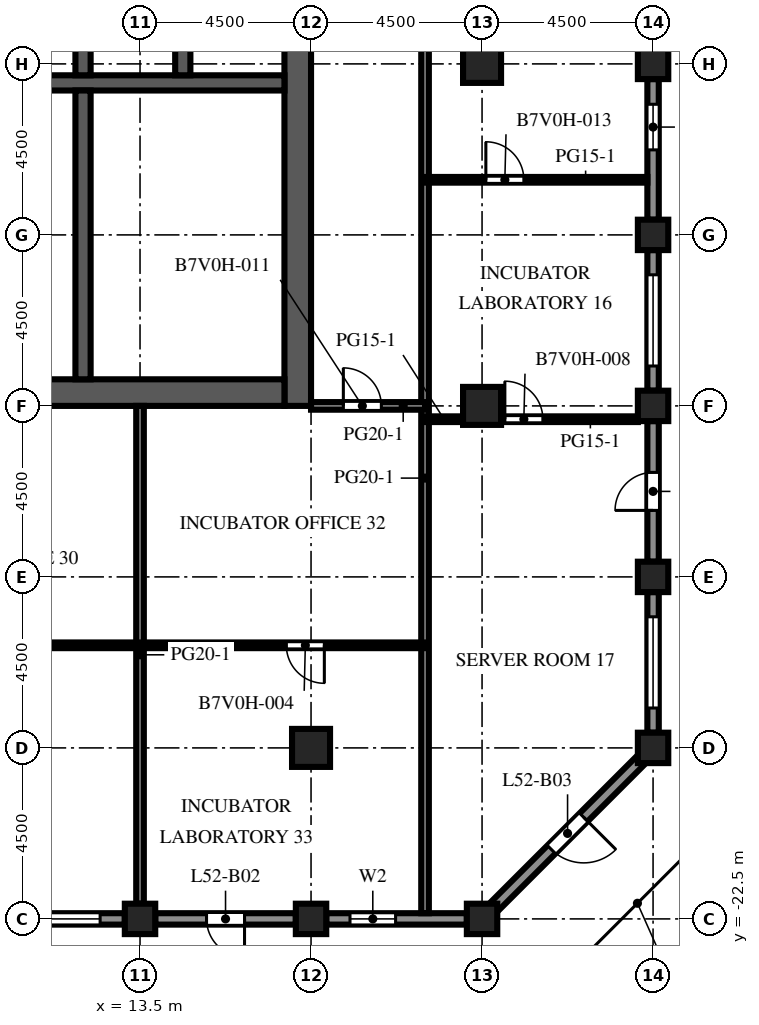
"""IFC4 building model, lengths in metres.
Left out: names, types, materials, properties, quantities, classifications, styles, units other than length and angle.
Written with IfcOpenShell. Run it as: python <this file> out.ifc"""

import sys

from ifc_helpers import new_model, si_unit, direction, frame, frame_2d, origin, origin_2d, place, context, subcontext, project, spatial, rectangle, extrude, element, fill, save


model = new_model("IFC4")
c1 = context("Model", 3, precision=1e-05, world=origin(), true_north=direction((0.0, 1.0)))
c2 = subcontext(c1, "Body", "Model", "MODEL_VIEW")
j1 = project(units=[si_unit("LENGTHUNIT", "METRE"), si_unit("PLANEANGLEUNIT", "RADIAN")], contexts=[c1])
p1 = place(None, origin())
s1 = spatial("IfcSite", under=j1, at=p1, CompositionType="ELEMENT")
p2 = place(p1, origin())
s2 = spatial("IfcBuilding", under=s1, at=p2, CompositionType="ELEMENT")
p3 = place(p2, frame((0.0, 0.0, 231.6)))
s3 = spatial("IfcBuildingStorey", under=s2, at=p3, CompositionType="ELEMENT", Elevation=231.6)
for number, where, z_axis, x_axis in (
    (1, (13.5, -22.5, 0.0), (0.0, 0.0, 1.0), (1.0, 0.0, 0.0)),
    (2, (18.0, -22.5, 0.0), (0.0, 0.0, 1.0), (1.0, 0.0, 0.0)),
    (3, (22.5, -22.5, 0.0), (0.0, 0.0, 1.0), (1.0, 0.0, 0.0)),
    (4, (27.0, -18.0, 0.0), (0.0, 0.0, 1.0), (1.0, 0.0, 0.0)),
    (5, (27.0, -13.5, 0.0), (0.0, 0.0, 1.0), (1.0, 0.0, 0.0)),
    (6, (27.0, -9.0, 0.0), (0.0, 0.0, 1.0), (1.0, 0.0, 0.0)),
    (7, (27.0, -4.5, 0.0), (0.0, 0.0, 1.0), (1.0, 0.0, 0.0)),
    (8, (27.0, 0.0, 0.0), (0.0, 0.0, 1.0), (1.0, 0.0, 0.0)),
):
    element("IfcColumn", number, at=place(p3, frame(where, z_axis=z_axis, x_axis=x_axis)), inside=s3, PredefinedType="COLUMN", context=c2, shape_type="SweptSolid", body=[
        extrude(rectangle(XDim=0.8, YDim=0.8, at=origin_2d()), origin(), (0.0, 0.0, 1.0), 4.1),
    ])
for number, where, z_axis, x_axis in (
    (9, (18.0, -18.0, 0.0), (0.0, 0.0, 1.0), (1.0, 0.0, 0.0)),
    (10, (22.5, -9.0, 0.0), (0.0, 0.0, 1.0), (1.0, 0.0, 0.0)),
    (11, (22.5, 0.0, 0.0), (0.0, 0.0, 1.0), (1.0, 0.0, 0.0)),
):
    element("IfcColumn", number, at=place(p3, frame(where, z_axis=z_axis, x_axis=x_axis)), inside=s3, PredefinedType="COLUMN", context=c2, shape_type="SweptSolid", body=[
        extrude(rectangle(XDim=1.0, YDim=1.0, at=origin_2d()), origin(), (0.0, 0.0, 1.0), 4.1),
    ])
p4 = place(p3, frame((17.65, -9.0, 0.0), z_axis=(0.0, 0.0, 1.0), x_axis=(0.0, 1.0, 0.0)))
e12 = element("IfcWall", 12, at=p4, inside=s3, PredefinedType="SHEAR", context=c2, shape_type="SweptSolid", body=[
    extrude(rectangle(XDim=27.5, YDim=0.7, at=frame_2d((13.75, 0.0))), origin(), (0.0, 0.0, 1.0), 4.1),
])
p5 = place(p4, frame((12.55, 0.0, 0.0)))
e13 = element("IfcOpeningElement", 13, at=p5, cuts=e12, PredefinedType="OPENING", context=c2, shape_type="SweptSolid", body=[
    extrude(rectangle(XDim=2.4, YDim=2.4, at=frame_2d((1.2, 1.2))), frame((0.0, 0.36, 0.0), z_axis=(0.0, -1.0, 0.0), x_axis=(1.0, 0.0, 0.0)), (0.0, 0.0, 1.0), 0.72),
])
p6 = place(p4, frame((6.825, 0.0, 0.0)))
e14 = element("IfcOpeningElement", 14, at=p6, cuts=e12, PredefinedType="OPENING", context=c2, shape_type="SweptSolid", body=[
    extrude(rectangle(XDim=1.2, YDim=2.1, at=frame_2d((0.6, 1.05))), frame((0.0, 0.36, 0.0), z_axis=(0.0, -1.0, 0.0), x_axis=(1.0, 0.0, 0.0)), (0.0, 0.0, 1.0), 0.72),
])
p7 = place(p4, frame((19.475, 0.0, 0.0)))
e15 = element("IfcOpeningElement", 15, at=p7, cuts=e12, PredefinedType="OPENING", context=c2, shape_type="SweptSolid", body=[
    extrude(rectangle(XDim=1.2, YDim=2.1, at=frame_2d((0.6, 1.05))), frame((0.0, 0.36, 0.0), z_axis=(0.0, -1.0, 0.0), x_axis=(1.0, 0.0, 0.0)), (0.0, 0.0, 1.0), 0.72),
])
p8 = place(p3, frame((6.7, -8.65, 0.0), z_axis=(0.0, 0.0, 1.0), x_axis=(1.0, 0.0, 0.0)))
e16 = element("IfcWall", 16, at=p8, inside=s3, PredefinedType="SHEAR", context=c2, shape_type="SweptSolid", body=[
    extrude(rectangle(XDim=10.6, YDim=0.7, at=frame_2d((5.3, 0.0))), origin(), (0.0, 0.0, 1.0), 4.1),
])
p9 = place(p3, frame((6.7, -0.5, 0.0), z_axis=(0.0, 0.0, 1.0), x_axis=(1.0, 0.0, 0.0)))
e17 = element("IfcWall", 17, at=p9, inside=s3, PredefinedType="SHEAR", context=c2, shape_type="SweptSolid", body=[
    extrude(rectangle(XDim=10.6, YDim=0.4, at=frame_2d((5.3, 0.0))), origin(), (0.0, 0.0, 1.0), 4.1),
])
for number, where, z_axis, x_axis in (
    (18, (12.0, -0.3, 0.0), (0.0, 0.0, 1.0), (0.0, 1.0, 0.0)),
    (19, (14.625, -0.3, 0.0), (0.0, 0.0, 1.0), (0.0, 1.0, 0.0)),
):
    element("IfcWall", number, at=place(p3, frame(where, z_axis=z_axis, x_axis=x_axis)), inside=s3, PredefinedType="SHEAR", context=c2, shape_type="SweptSolid", body=[
        extrude(rectangle(XDim=2.9, YDim=0.4, at=frame_2d((1.45, 0.0))), origin(), (0.0, 0.0, 1.0), 4.1),
    ])
p10 = place(p3, frame((12.0, -8.3, 0.0), z_axis=(0.0, 0.0, 1.0), x_axis=(0.0, 1.0, 0.0)))
e20 = element("IfcWall", 20, at=p10, inside=s3, PredefinedType="SHEAR", context=c2, shape_type="SweptSolid", body=[
    extrude(rectangle(XDim=7.6, YDim=0.4, at=frame_2d((3.8, 0.0))), origin(), (0.0, 0.0, 1.0), 4.1),
])
p11 = place(p3, frame((13.1, -22.5, 0.0), z_axis=(0.0, 0.0, 1.0), x_axis=(-1.0, 0.0, 0.0)))
e21 = element("IfcWall", 21, at=p11, inside=s3, PredefinedType="SOLIDWALL", context=c2, shape_type="SweptSolid", body=[
    extrude(rectangle(XDim=3.7, YDim=0.3, at=frame_2d((1.85, 0.0))), origin(), (0.0, 0.0, 1.0), 2.85),
])
p12 = place(p11, frame((0.65, 0.0, 0.8)))
e22 = element("IfcOpeningElement", 22, at=p12, cuts=e21, PredefinedType="OPENING", context=c2, shape_type="SweptSolid", body=[
    extrude(rectangle(XDim=2.4, YDim=1.7, at=frame_2d((1.2, 0.85))), frame((0.0, 0.16, 0.0), z_axis=(0.0, -1.0, 0.0), x_axis=(1.0, 0.0, 0.0)), (0.0, 0.0, 1.0), 0.32),
])
p13 = place(p3, frame((17.6, -22.5, 0.0), z_axis=(0.0, 0.0, 1.0), x_axis=(-1.0, 0.0, 0.0)))
e23 = element("IfcWall", 23, at=p13, inside=s3, PredefinedType="SOLIDWALL", context=c2, shape_type="SweptSolid", body=[
    extrude(rectangle(XDim=3.7, YDim=0.3, at=frame_2d((1.85, 0.0))), origin(), (0.0, 0.0, 1.0), 2.85),
])
p14 = place(p13, frame((1.35, 0.0, 0.0)))
e24 = element("IfcOpeningElement", 24, at=p14, cuts=e23, PredefinedType="OPENING", context=c2, shape_type="SweptSolid", body=[
    extrude(rectangle(XDim=1.0, YDim=2.2, at=frame_2d((0.5, 1.1))), frame((0.0, 0.16, 0.0), z_axis=(0.0, -1.0, 0.0), x_axis=(1.0, 0.0, 0.0)), (0.0, 0.0, 1.0), 0.32),
])
p15 = place(p3, frame((22.1, -22.5, 0.0), z_axis=(0.0, 0.0, 1.0), x_axis=(-1.0, 0.0, 0.0)))
e25 = element("IfcWall", 25, at=p15, inside=s3, PredefinedType="SOLIDWALL", context=c2, shape_type="SweptSolid", body=[
    extrude(rectangle(XDim=3.7, YDim=0.3, at=frame_2d((1.85, 0.0))), origin(), (0.0, 0.0, 1.0), 2.85),
])
p16 = place(p15, frame((1.875, 0.0, 0.8)))
e26 = element("IfcOpeningElement", 26, at=p16, cuts=e25, PredefinedType="OPENING", context=c2, shape_type="SweptSolid", body=[
    extrude(rectangle(XDim=1.2, YDim=1.7, at=frame_2d((0.6, 0.85))), frame((0.0, 0.16, 0.0), z_axis=(0.0, -1.0, 0.0), x_axis=(1.0, 0.0, 0.0)), (0.0, 0.0, 1.0), 0.32),
])
p17 = place(p3, frame((26.706, -18.294, 0.0), z_axis=(0.0, 0.0, 1.0), x_axis=(-0.707106781187, -0.707106781187, 0.0)))
e27 = element("IfcWall", 27, at=p17, inside=s3, PredefinedType="SOLIDWALL", context=c2, shape_type="SweptSolid", body=[
    extrude(rectangle(XDim=5.532, YDim=0.3, at=frame_2d((2.766, 0.0))), origin(), (0.0, 0.0, 1.0), 2.85),
])
p18 = place(p17, frame((2.166, 0.0, 0.0)))
e28 = element("IfcOpeningElement", 28, at=p18, cuts=e27, PredefinedType="OPENING", context=c2, shape_type="SweptSolid", body=[
    extrude(rectangle(XDim=1.2, YDim=2.2, at=frame_2d((0.6, 1.1))), frame((0.0, 0.16, 0.0), z_axis=(0.0, -1.0, 0.0), x_axis=(1.0, 0.0, 0.0)), (0.0, 0.0, 1.0), 0.32),
])
p19 = place(p3, frame((27.0, -13.9, 0.0), z_axis=(0.0, 0.0, 1.0), x_axis=(0.0, -1.0, 0.0)))
e29 = element("IfcWall", 29, at=p19, inside=s3, PredefinedType="SOLIDWALL", context=c2, shape_type="SweptSolid", body=[
    extrude(rectangle(XDim=3.7, YDim=0.3, at=frame_2d((1.85, 0.0))), origin(), (0.0, 0.0, 1.0), 2.85),
])
p20 = place(p19, frame((0.65, 0.0, 0.8)))
e30 = element("IfcOpeningElement", 30, at=p20, cuts=e29, PredefinedType="OPENING", context=c2, shape_type="SweptSolid", body=[
    extrude(rectangle(XDim=2.4, YDim=1.7, at=frame_2d((1.2, 0.85))), frame((0.0, 0.16, 0.0), z_axis=(0.0, -1.0, 0.0), x_axis=(1.0, 0.0, 0.0)), (0.0, 0.0, 1.0), 0.32),
])
p21 = place(p3, frame((27.0, -9.4, 0.0), z_axis=(0.0, 0.0, 1.0), x_axis=(0.0, -1.0, 0.0)))
e31 = element("IfcWall", 31, at=p21, inside=s3, PredefinedType="SOLIDWALL", context=c2, shape_type="SweptSolid", body=[
    extrude(rectangle(XDim=3.7, YDim=0.3, at=frame_2d((1.85, 0.0))), origin(), (0.0, 0.0, 1.0), 2.85),
])
p22 = place(p21, frame((1.35, 0.0, 0.0)))
e32 = element("IfcOpeningElement", 32, at=p22, cuts=e31, PredefinedType="OPENING", context=c2, shape_type="SweptSolid", body=[
    extrude(rectangle(XDim=1.0, YDim=2.2, at=frame_2d((0.5, 1.1))), frame((0.0, 0.16, 0.0), z_axis=(0.0, -1.0, 0.0), x_axis=(1.0, 0.0, 0.0)), (0.0, 0.0, 1.0), 0.32),
])
p23 = place(p3, frame((27.0, -4.9, 0.0), z_axis=(0.0, 0.0, 1.0), x_axis=(0.0, -1.0, 0.0)))
e33 = element("IfcWall", 33, at=p23, inside=s3, PredefinedType="SOLIDWALL", context=c2, shape_type="SweptSolid", body=[
    extrude(rectangle(XDim=3.7, YDim=0.3, at=frame_2d((1.85, 0.0))), origin(), (0.0, 0.0, 1.0), 2.85),
])
p24 = place(p23, frame((0.65, 0.0, 0.8)))
e34 = element("IfcOpeningElement", 34, at=p24, cuts=e33, PredefinedType="OPENING", context=c2, shape_type="SweptSolid", body=[
    extrude(rectangle(XDim=2.4, YDim=1.7, at=frame_2d((1.2, 0.85))), frame((0.0, 0.16, 0.0), z_axis=(0.0, -1.0, 0.0), x_axis=(1.0, 0.0, 0.0)), (0.0, 0.0, 1.0), 0.32),
])
p25 = place(p3, frame((27.0, -0.4, 0.0), z_axis=(0.0, 0.0, 1.0), x_axis=(0.0, -1.0, 0.0)))
e35 = element("IfcWall", 35, at=p25, inside=s3, PredefinedType="SOLIDWALL", context=c2, shape_type="SweptSolid", body=[
    extrude(rectangle(XDim=3.7, YDim=0.3, at=frame_2d((1.85, 0.0))), origin(), (0.0, 0.0, 1.0), 2.85),
])
p26 = place(p25, frame((0.663, 0.0, 0.8)))
e36 = element("IfcOpeningElement", 36, at=p26, cuts=e35, PredefinedType="OPENING", context=c2, shape_type="SweptSolid", body=[
    extrude(rectangle(XDim=1.2, YDim=1.7, at=frame_2d((0.6, 0.85))), frame((0.0, 0.16, 0.0), z_axis=(0.0, -1.0, 0.0), x_axis=(1.0, 0.0, 0.0)), (0.0, 0.0, 1.0), 0.32),
])
for number, where, z_axis, x_axis in (
    (37, (8.2, -5.26, 0.0), (0.0, 0.0, 1.0), (1.0, 0.0, 0.0)),
    (38, (8.2, -2.98, 0.0), (0.0, 0.0, 1.0), (1.0, 0.0, 0.0)),
):
    element("IfcWall", number, at=place(p3, frame(where, z_axis=z_axis, x_axis=x_axis)), inside=s3, PredefinedType="PARTITIONING", context=c2, shape_type="SweptSolid", body=[
        extrude(rectangle(XDim=3.6, YDim=0.1, at=frame_2d((1.8, 0.0))), origin(), (0.0, 0.0, 1.0), 3.65),
    ])
p27 = place(p3, frame((13.5, -22.1, 0.0), z_axis=(0.0, 0.0, 1.0), x_axis=(0.0, 1.0, 0.0)))
e39 = element("IfcWall", 39, at=p27, inside=s3, PredefinedType="PARTITIONING", context=c2, shape_type="SweptSolid", body=[
    extrude(rectangle(XDim=13.1, YDim=0.2, at=frame_2d((6.55, 0.0))), origin(), (0.0, 0.0, 1.0), 3.65),
])
p28 = place(p3, frame((21.0, 3.25, 0.0), z_axis=(0.0, 0.0, 1.0), x_axis=(0.0, -1.0, 0.0)))
e40 = element("IfcWall", 40, at=p28, inside=s3, PredefinedType="PARTITIONING", context=c2, shape_type="SweptSolid", body=[
    extrude(rectangle(XDim=25.6, YDim=0.2, at=frame_2d((12.8, 0.0))), origin(), (0.0, 0.0, 1.0), 3.65),
])
p29 = place(p28, frame((1.7, 0.0, 0.0)))
e41 = element("IfcOpeningElement", 41, at=p29, cuts=e40, PredefinedType="OPENING", context=c2, shape_type="SweptSolid", body=[
    extrude(rectangle(XDim=1.0, YDim=2.1, at=frame_2d((0.5, 1.05))), frame((0.0, 0.11, 0.0), z_axis=(0.0, -1.0, 0.0), x_axis=(1.0, 0.0, 0.0)), (0.0, 0.0, 1.0), 0.22),
])
p30 = place(p3, frame((21.0, -15.3, 0.0), z_axis=(0.0, 0.0, 1.0), x_axis=(-1.0, 0.0, 0.0)))
e42 = element("IfcWall", 42, at=p30, inside=s3, PredefinedType="PARTITIONING", context=c2, shape_type="SweptSolid", body=[
    extrude(rectangle(XDim=34.5, YDim=0.15, at=frame_2d((17.25, 0.0))), origin(), (0.0, 0.0, 1.0), 3.65),
])
p31 = place(p30, frame((31.9, 0.0, 0.0)))
e43 = element("IfcOpeningElement", 43, at=p31, cuts=e42, PredefinedType="OPENING", context=c2, shape_type="SweptSolid", body=[
    extrude(rectangle(XDim=1.0, YDim=2.1, at=frame_2d((0.5, 1.05))), frame((0.0, 0.085, 0.0), z_axis=(0.0, -1.0, 0.0), x_axis=(1.0, 0.0, 0.0)), (0.0, 0.0, 1.0), 0.17),
])
p32 = place(p30, frame((23.4, 0.0, 0.0)))
e44 = element("IfcOpeningElement", 44, at=p32, cuts=e42, PredefinedType="OPENING", context=c2, shape_type="SweptSolid", body=[
    extrude(rectangle(XDim=1.0, YDim=2.1, at=frame_2d((0.5, 1.05))), frame((0.0, 0.085, 0.0), z_axis=(0.0, -1.0, 0.0), x_axis=(1.0, 0.0, 0.0)), (0.0, 0.0, 1.0), 0.17),
])
p33 = place(p30, frame((11.65, 0.0, 0.0)))
e45 = element("IfcOpeningElement", 45, at=p33, cuts=e42, PredefinedType="OPENING", context=c2, shape_type="SweptSolid", body=[
    extrude(rectangle(XDim=1.0, YDim=2.1, at=frame_2d((0.5, 1.05))), frame((0.0, 0.085, 0.0), z_axis=(0.0, -1.0, 0.0), x_axis=(1.0, 0.0, 0.0)), (0.0, 0.0, 1.0), 0.17),
])
p34 = place(p30, frame((2.65, 0.0, 0.0)))
e46 = element("IfcOpeningElement", 46, at=p34, cuts=e42, PredefinedType="OPENING", context=c2, shape_type="SweptSolid", body=[
    extrude(rectangle(XDim=1.0, YDim=2.1, at=frame_2d((0.5, 1.05))), frame((0.0, 0.085, 0.0), z_axis=(0.0, -1.0, 0.0), x_axis=(1.0, 0.0, 0.0)), (0.0, 0.0, 1.0), 0.17),
])
p35 = place(p3, frame((21.0, -9.35, 0.0), z_axis=(0.0, 0.0, 1.0), x_axis=(1.0, 0.0, 0.0)))
e47 = element("IfcWall", 47, at=p35, inside=s3, PredefinedType="PARTITIONING", context=c2, shape_type="SweptSolid", body=[
    extrude(rectangle(XDim=1.0, YDim=0.15, at=frame_2d((0.5, 0.0))), origin(), (0.0, 0.0, 1.0), 3.65),
])
p36 = place(p3, frame((26.6, -9.35, 0.0), z_axis=(0.0, 0.0, 1.0), x_axis=(-1.0, 0.0, 0.0)))
e48 = element("IfcWall", 48, at=p36, inside=s3, PredefinedType="PARTITIONING", context=c2, shape_type="SweptSolid", body=[
    extrude(rectangle(XDim=3.6, YDim=0.15, at=frame_2d((1.8, 0.0))), origin(), (0.0, 0.0, 1.0), 3.65),
])
p37 = place(p36, frame((2.5, 0.0, 0.0)))
e49 = element("IfcOpeningElement", 49, at=p37, cuts=e48, PredefinedType="OPENING", context=c2, shape_type="SweptSolid", body=[
    extrude(rectangle(XDim=1.0, YDim=2.1, at=frame_2d((0.5, 1.05))), frame((0.0, 0.085, 0.0), z_axis=(0.0, -1.0, 0.0), x_axis=(1.0, 0.0, 0.0)), (0.0, 0.0, 1.0), 0.17),
])
p38 = place(p3, frame((21.0, -9.0, 0.0), z_axis=(0.0, 0.0, 1.0), x_axis=(-1.0, 0.0, 0.0)))
e50 = element("IfcWall", 50, at=p38, inside=s3, PredefinedType="PARTITIONING", context=c2, shape_type="SweptSolid", body=[
    extrude(rectangle(XDim=3.0, YDim=0.2, at=frame_2d((1.5, 0.0))), origin(), (0.0, 0.0, 1.0), 3.65),
])
p39 = place(p38, frame((1.15, 0.0, 0.0)))
e51 = element("IfcOpeningElement", 51, at=p39, cuts=e50, PredefinedType="OPENING", context=c2, shape_type="SweptSolid", body=[
    extrude(rectangle(XDim=1.0, YDim=2.1, at=frame_2d((0.5, 1.05))), frame((0.0, 0.11, 0.0), z_axis=(0.0, -1.0, 0.0), x_axis=(1.0, 0.0, 0.0)), (0.0, 0.0, 1.0), 0.22),
])
p40 = place(p3, frame((26.85, -3.05, 0.0), z_axis=(0.0, 0.0, 1.0), x_axis=(-1.0, 0.0, 0.0)))
e52 = element("IfcWall", 52, at=p40, inside=s3, PredefinedType="PARTITIONING", context=c2, shape_type="SweptSolid", body=[
    extrude(rectangle(XDim=5.85, YDim=0.15, at=frame_2d((2.925, 0.0))), origin(), (0.0, 0.0, 1.0), 3.65),
])
p41 = place(p40, frame((3.25, 0.0, 0.0)))
e53 = element("IfcOpeningElement", 53, at=p41, cuts=e52, PredefinedType="OPENING", context=c2, shape_type="SweptSolid", body=[
    extrude(rectangle(XDim=1.0, YDim=2.1, at=frame_2d((0.5, 1.05))), frame((0.0, 0.085, 0.0), z_axis=(0.0, -1.0, 0.0), x_axis=(1.0, 0.0, 0.0)), (0.0, 0.0, 1.0), 0.17),
])
p42 = place(p12, origin())
e54 = element("IfcWindow", 54, at=p42, inside=s3, PartitioningType="SINGLE_PANEL", PredefinedType="WINDOW", context=c2, shape_type="SweptSolid", body=[
    extrude(rectangle(XDim=2.4, YDim=1.7, at=frame_2d((1.2, 0.85))), frame((0.0, 0.03, 0.0), z_axis=(0.0, -1.0, 0.0), x_axis=(1.0, 0.0, 0.0)), (0.0, 0.0, 1.0), 0.06),
])
fill(e22, e54)
p43 = place(p14, origin())
e55 = element("IfcDoor", 55, at=p43, inside=s3, OperationType="SINGLE_SWING_LEFT", PredefinedType="DOOR", context=c2, shape_type="SweptSolid", body=[
    extrude(rectangle(XDim=1.0, YDim=2.2, at=frame_2d((0.5, 1.1))), frame((0.0, 0.025, 0.0), z_axis=(0.0, -1.0, 0.0), x_axis=(1.0, 0.0, 0.0)), (0.0, 0.0, 1.0), 0.05),
])
fill(e24, e55)
p44 = place(p16, origin())
e56 = element("IfcWindow", 56, at=p44, inside=s3, PartitioningType="SINGLE_PANEL", PredefinedType="WINDOW", context=c2, shape_type="SweptSolid", body=[
    extrude(rectangle(XDim=1.2, YDim=1.7, at=frame_2d((0.6, 0.85))), frame((0.0, 0.03, 0.0), z_axis=(0.0, -1.0, 0.0), x_axis=(1.0, 0.0, 0.0)), (0.0, 0.0, 1.0), 0.06),
])
fill(e26, e56)
p45 = place(p18, origin())
e57 = element("IfcDoor", 57, at=p45, inside=s3, OperationType="SINGLE_SWING_LEFT", PredefinedType="DOOR", context=c2, shape_type="SweptSolid", body=[
    extrude(rectangle(XDim=1.2, YDim=2.2, at=frame_2d((0.6, 1.1))), frame((0.0, 0.025, 0.0), z_axis=(0.0, -1.0, 0.0), x_axis=(1.0, 0.0, 0.0)), (0.0, 0.0, 1.0), 0.05),
])
fill(e28, e57)
p46 = place(p20, origin())
e58 = element("IfcWindow", 58, at=p46, inside=s3, PartitioningType="SINGLE_PANEL", PredefinedType="WINDOW", context=c2, shape_type="SweptSolid", body=[
    extrude(rectangle(XDim=2.4, YDim=1.7, at=frame_2d((1.2, 0.85))), frame((0.0, 0.03, 0.0), z_axis=(0.0, -1.0, 0.0), x_axis=(1.0, 0.0, 0.0)), (0.0, 0.0, 1.0), 0.06),
])
fill(e30, e58)
p47 = place(p22, origin())
e59 = element("IfcDoor", 59, at=p47, inside=s3, OperationType="SINGLE_SWING_RIGHT", PredefinedType="DOOR", context=c2, shape_type="SweptSolid", body=[
    extrude(rectangle(XDim=1.0, YDim=2.2, at=frame_2d((0.5, 1.1))), frame((0.0, 0.025, 0.0), z_axis=(0.0, -1.0, 0.0), x_axis=(1.0, 0.0, 0.0)), (0.0, 0.0, 1.0), 0.05),
])
fill(e32, e59)
p48 = place(p24, origin())
e60 = element("IfcWindow", 60, at=p48, inside=s3, PartitioningType="SINGLE_PANEL", PredefinedType="WINDOW", context=c2, shape_type="SweptSolid", body=[
    extrude(rectangle(XDim=2.4, YDim=1.7, at=frame_2d((1.2, 0.85))), frame((0.0, 0.03, 0.0), z_axis=(0.0, -1.0, 0.0), x_axis=(1.0, 0.0, 0.0)), (0.0, 0.0, 1.0), 0.06),
])
fill(e34, e60)
p49 = place(p26, origin())
e61 = element("IfcWindow", 61, at=p49, inside=s3, PartitioningType="SINGLE_PANEL", PredefinedType="WINDOW", context=c2, shape_type="SweptSolid", body=[
    extrude(rectangle(XDim=1.2, YDim=1.7, at=frame_2d((0.6, 0.85))), frame((0.0, 0.03, 0.0), z_axis=(0.0, -1.0, 0.0), x_axis=(1.0, 0.0, 0.0)), (0.0, 0.0, 1.0), 0.06),
])
fill(e36, e61)
p50 = place(p6, frame((1.2, 0.0, 0.0), z_axis=(0.0, 0.0, 1.0), x_axis=(-1.0, 0.0, 0.0)))
e62 = element("IfcDoor", 62, at=p50, inside=s3, OperationType="SINGLE_SWING_LEFT", PredefinedType="DOOR", context=c2, shape_type="SweptSolid", body=[
    extrude(rectangle(XDim=1.2, YDim=2.1, at=frame_2d((0.6, 1.05))), frame((0.0, 0.025, 0.0), z_axis=(0.0, -1.0, 0.0), x_axis=(1.0, 0.0, 0.0)), (0.0, 0.0, 1.0), 0.05),
])
fill(e14, e62)
p51 = place(p34, origin())
e63 = element("IfcDoor", 63, at=p51, inside=s3, OperationType="SINGLE_SWING_LEFT", PredefinedType="DOOR", context=c2, shape_type="SweptSolid", body=[
    extrude(rectangle(XDim=1.0, YDim=2.1, at=frame_2d((0.5, 1.05))), frame((0.0, 0.025, 0.0), z_axis=(0.0, -1.0, 0.0), x_axis=(1.0, 0.0, 0.0)), (0.0, 0.0, 1.0), 0.05),
])
fill(e46, e63)
p52 = place(p37, origin())
e64 = element("IfcDoor", 64, at=p52, inside=s3, OperationType="SINGLE_SWING_RIGHT", PredefinedType="DOOR", context=c2, shape_type="SweptSolid", body=[
    extrude(rectangle(XDim=1.0, YDim=2.1, at=frame_2d((0.5, 1.05))), frame((0.0, 0.025, 0.0), z_axis=(0.0, -1.0, 0.0), x_axis=(1.0, 0.0, 0.0)), (0.0, 0.0, 1.0), 0.05),
])
fill(e49, e64)
p53 = place(p39, origin())
e65 = element("IfcDoor", 65, at=p53, inside=s3, OperationType="SINGLE_SWING_RIGHT", PredefinedType="DOOR", context=c2, shape_type="SweptSolid", body=[
    extrude(rectangle(XDim=1.0, YDim=2.1, at=frame_2d((0.5, 1.05))), frame((0.0, 0.025, 0.0), z_axis=(0.0, -1.0, 0.0), x_axis=(1.0, 0.0, 0.0)), (0.0, 0.0, 1.0), 0.05),
])
fill(e51, e65)
p54 = place(p41, origin())
e66 = element("IfcDoor", 66, at=p54, inside=s3, OperationType="SINGLE_SWING_RIGHT", PredefinedType="DOOR", context=c2, shape_type="SweptSolid", body=[
    extrude(rectangle(XDim=1.0, YDim=2.1, at=frame_2d((0.5, 1.05))), frame((0.0, 0.025, 0.0), z_axis=(0.0, -1.0, 0.0), x_axis=(1.0, 0.0, 0.0)), (0.0, 0.0, 1.0), 0.05),
])
fill(e53, e66)
save(model, sys.argv[1])
